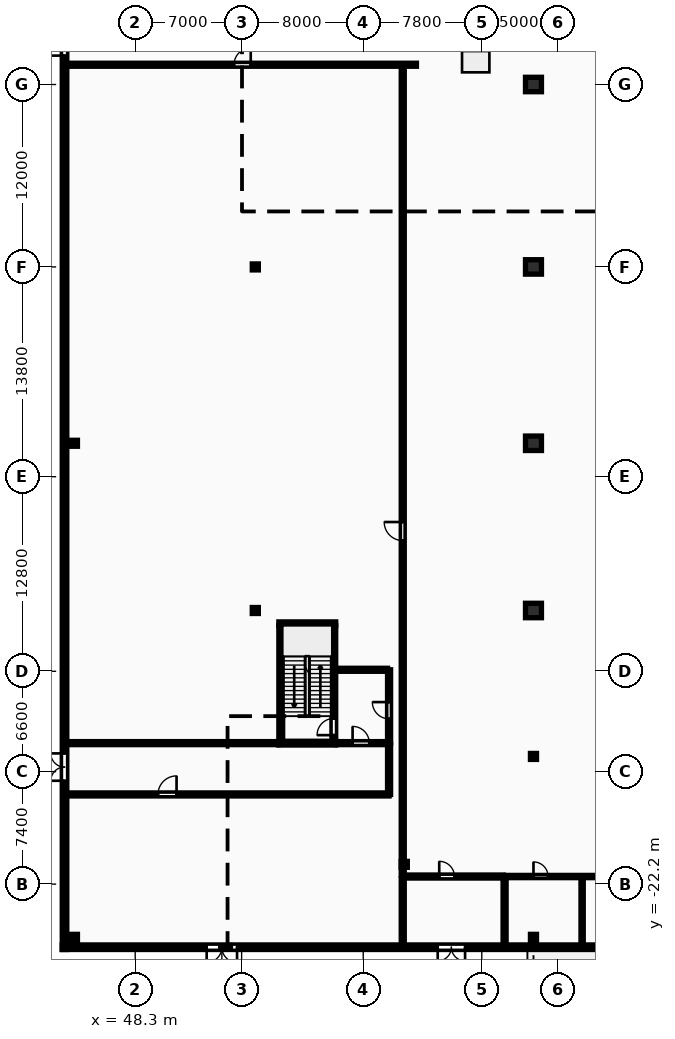
"""IFC4 building model, lengths in metres.
Left out: names, types, materials, properties, quantities, classifications, styles, units other than length and angle.
Written with IfcOpenShell. Run it as: python <this file> out.ifc"""

import sys

from ifc_helpers import new_model, si_unit, direction, frame, frame_2d, origin, origin_2d, place, context, subcontext, project, spatial, rectangle, i_section, extrude, element, fill, save


model = new_model("IFC4")
c1 = context("Model", 3, precision=1e-05, world=origin(), true_north=direction((0.0, 1.0)))
c2 = subcontext(c1, "Body", "Model", "MODEL_VIEW")
j1 = project(units=[si_unit("LENGTHUNIT", "METRE"), si_unit("PLANEANGLEUNIT", "RADIAN")], contexts=[c1])
p1 = place(None, origin())
s1 = spatial("IfcSite", under=j1, at=p1, CompositionType="ELEMENT")
p2 = place(p1, origin())
s2 = spatial("IfcBuilding", under=s1, at=p2, CompositionType="ELEMENT")
p3 = place(p2, origin())
s3 = spatial("IfcBuildingStorey", under=s2, at=p3, CompositionType="ELEMENT", Elevation=0.0)
for number, where, z_axis, x_axis in (
    (1, (74.5, -4.2, 0.0), (0.0, 0.0, 1.0), (1.0, 0.0, 0.0)),
    (2, (74.5, 6.8, 0.0), (0.0, 0.0, 1.0), (1.0, 0.0, 0.0)),
    (3, (74.5, 18.4, 0.0), (0.0, 0.0, 1.0), (1.0, 0.0, 0.0)),
    (4, (74.5, 30.4, 0.0), (0.0, 0.0, 1.0), (1.0, 0.0, 0.0)),
):
    element("IfcColumn", number, at=place(p3, frame(where, z_axis=z_axis, x_axis=x_axis)), inside=s3, PredefinedType="COLUMN", context=c2, shape_type="SweptSolid", body=[
        extrude(rectangle(XDim=1.05, YDim=0.95, at=origin_2d()), origin(), (0.0, 0.0, 1.0), 5.4),
    ])
for number, where, z_axis, x_axis in (
    (5, (56.2, -4.2, 0.0), (0.0, 0.0, 1.0), (1.0, 0.0, 0.0)),
    (6, (56.2, 18.4, 0.0), (0.0, 0.0, 1.0), (1.0, 0.0, 0.0)),
    (7, (74.5, -13.8, 0.0), (0.0, 0.0, 1.0), (1.0, 0.0, 0.0)),
    (8, (66.0, -20.9, 0.0), (0.0, 0.0, 1.0), (1.0, 0.0, 0.0)),
    (9, (44.3, -25.7, 0.0), (0.0, 0.0, 1.0), (1.0, 0.0, 0.0)),
    (10, (44.3, 6.8, 0.0), (0.0, 0.0, 1.0), (1.0, 0.0, 0.0)),
    (11, (74.5, -25.7, 0.0), (0.0, 0.0, 1.0), (1.0, 0.0, 0.0)),
):
    element("IfcColumn", number, at=place(p3, frame(where, z_axis=z_axis, x_axis=x_axis)), inside=s3, PredefinedType="COLUMN", context=c2, shape_type="SweptSolid", body=[
        extrude(i_section(OverallWidth=0.399, OverallDepth=0.394, WebThickness=0.023, FlangeThickness=0.037, FilletRadius=0.015, at=origin_2d()), origin(), (0.0, 0.0, 1.0), 5.4),
    ])
p4 = place(p3, frame((43.5, -26.35, 0.0), z_axis=(0.0, 0.0, 1.0), x_axis=(1.0, 0.0, 0.0)))
e12 = element("IfcWall", 12, at=p4, inside=s3, PredefinedType="STANDARD", context=c2, shape_type="SweptSolid", body=[
    extrude(rectangle(XDim=46.0, YDim=0.3, at=frame_2d((23.0, 0.0))), origin(), (0.0, 0.0, 1.0), 5.1),
])
p5 = place(p4, frame((9.5, 0.0, 0.0)))
e13 = element("IfcOpeningElement", 13, at=p5, cuts=e12, PredefinedType="OPENING", context=c2, shape_type="SweptSolid", body=[
    extrude(rectangle(XDim=2.0, YDim=2.6, at=frame_2d((1.0, 1.3))), frame((0.0, 0.16, 0.0), z_axis=(0.0, -1.0, 0.0), x_axis=(1.0, 0.0, 0.0)), (0.0, 0.0, 1.0), 0.32),
])
p6 = place(p4, frame((24.7, 0.0, 0.0)))
e14 = element("IfcOpeningElement", 14, at=p6, cuts=e12, PredefinedType="OPENING", context=c2, shape_type="SweptSolid", body=[
    extrude(rectangle(XDim=1.8, YDim=2.2, at=frame_2d((0.9, 1.1))), frame((0.0, 0.16, 0.0), z_axis=(0.0, -1.0, 0.0), x_axis=(1.0, 0.0, 0.0)), (0.0, 0.0, 1.0), 0.32),
])
p7 = place(p4, frame((43.4, 0.0, 0.0)))
e15 = element("IfcOpeningElement", 15, at=p7, cuts=e12, PredefinedType="OPENING", context=c2, shape_type="SweptSolid", body=[
    extrude(rectangle(XDim=1.8, YDim=2.2, at=frame_2d((0.9, 1.1))), frame((0.0, 0.16, 0.0), z_axis=(0.0, -1.0, 0.0), x_axis=(1.0, 0.0, 0.0)), (0.0, 0.0, 1.0), 0.32),
])
p8 = place(p3, frame((43.65, 109.2, 0.0), z_axis=(0.0, 0.0, 1.0), x_axis=(0.0, -1.0, 0.0)))
e16 = element("IfcWall", 16, at=p8, inside=s3, PredefinedType="STANDARD", context=c2, shape_type="SweptSolid", body=[
    extrude(rectangle(XDim=135.7, YDim=0.3, at=frame_2d((67.85, 0.0))), origin(), (0.0, 0.0, 1.0), 5.1),
])
p9 = place(p8, frame((75.1, 0.0, 0.0)))
e17 = element("IfcOpeningElement", 17, at=p9, cuts=e16, PredefinedType="OPENING", context=c2, shape_type="SweptSolid", body=[
    extrude(rectangle(XDim=1.8, YDim=2.2, at=frame_2d((0.9, 1.1))), frame((0.0, 0.16, 0.0), z_axis=(0.0, -1.0, 0.0), x_axis=(1.0, 0.0, 0.0)), (0.0, 0.0, 1.0), 0.32),
])
p10 = place(p8, frame((28.1, 0.0, 0.0)))
e18 = element("IfcOpeningElement", 18, at=p10, cuts=e16, PredefinedType="OPENING", context=c2, shape_type="SweptSolid", body=[
    extrude(rectangle(XDim=1.8, YDim=2.2, at=frame_2d((0.9, 1.1))), frame((0.0, 0.16, 0.0), z_axis=(0.0, -1.0, 0.0), x_axis=(1.0, 0.0, 0.0)), (0.0, 0.0, 1.0), 0.32),
])
p11 = place(p8, frame((36.0, 0.0, 0.0)))
e19 = element("IfcOpeningElement", 19, at=p11, cuts=e16, PredefinedType="OPENING", context=c2, shape_type="SweptSolid", body=[
    extrude(rectangle(XDim=2.0, YDim=2.6, at=frame_2d((1.0, 1.3))), frame((0.0, 0.16, 0.0), z_axis=(0.0, -1.0, 0.0), x_axis=(1.0, 0.0, 0.0)), (0.0, 0.0, 1.0), 0.32),
])
p12 = place(p8, frame((48.0, 0.0, 0.0)))
e20 = element("IfcOpeningElement", 20, at=p12, cuts=e16, PredefinedType="OPENING", context=c2, shape_type="SweptSolid", body=[
    extrude(rectangle(XDim=1.8, YDim=2.2, at=frame_2d((0.9, 1.1))), frame((0.0, 0.16, 0.0), z_axis=(0.0, -1.0, 0.0), x_axis=(1.0, 0.0, 0.0)), (0.0, 0.0, 1.0), 0.32),
])
p13 = place(p8, frame((122.8, 0.0, 0.0)))
e21 = element("IfcOpeningElement", 21, at=p13, cuts=e16, PredefinedType="OPENING", context=c2, shape_type="SweptSolid", body=[
    extrude(rectangle(XDim=1.8, YDim=2.2, at=frame_2d((0.9, 1.1))), frame((0.0, 0.16, 0.0), z_axis=(0.0, -1.0, 0.0), x_axis=(1.0, 0.0, 0.0)), (0.0, 0.0, 1.0), 0.32),
])
p14 = place(p3, frame((57.875, -12.8, 0.0), z_axis=(0.0, 0.0, 1.0), x_axis=(0.0, 1.0, 0.0)))
e22 = element("IfcWall", 22, at=p14, inside=s3, PredefinedType="SHEAR", context=c2, shape_type="SweptSolid", body=[
    extrude(rectangle(XDim=7.6, YDim=0.25, at=frame_2d((3.8, 0.0))), origin(), (0.0, 0.0, 1.0), 5.4),
])
for number, where, z_axis, x_axis in (
    (23, (57.75, -12.925, 0.0), (0.0, 0.0, 1.0), (1.0, 0.0, 0.0)),
    (24, (57.75, -5.075, 0.0), (0.0, 0.0, 1.0), (1.0, 0.0, 0.0)),
):
    element("IfcWall", number, at=place(p3, frame(where, z_axis=z_axis, x_axis=x_axis)), inside=s3, PredefinedType="SHEAR", context=c2, shape_type="SweptSolid", body=[
        extrude(rectangle(XDim=3.74, YDim=0.25, at=frame_2d((1.87, 0.0))), origin(), (0.0, 0.0, 1.0), 5.4),
    ])
p15 = place(p3, frame((61.365, -12.8, 0.0), z_axis=(0.0, 0.0, 1.0), x_axis=(0.0, 1.0, 0.0)))
e25 = element("IfcWall", 25, at=p15, inside=s3, PredefinedType="SHEAR", context=c2, shape_type="SweptSolid", body=[
    extrude(rectangle(XDim=7.6, YDim=0.25, at=frame_2d((3.8, 0.0))), origin(), (0.0, 0.0, 1.0), 5.4),
])
p16 = place(p15, frame((0.4, 0.0, 0.0)))
e26 = element("IfcOpeningElement", 26, at=p16, cuts=e25, PredefinedType="OPENING", context=c2, shape_type="SweptSolid", body=[
    extrude(rectangle(XDim=1.1, YDim=2.1, at=frame_2d((0.55, 1.05))), frame((0.0, 0.135, 0.0), z_axis=(0.0, -1.0, 0.0), x_axis=(1.0, 0.0, 0.0)), (0.0, 0.0, 1.0), 0.27),
])
p17 = place(p3, frame((65.0, -12.925, 0.0), z_axis=(0.0, 0.0, 1.0), x_axis=(0.0, 1.0, 0.0)))
e27 = element("IfcWall", 27, at=p17, inside=s3, PredefinedType="PARTITIONING", context=c2, shape_type="SweptSolid", body=[
    extrude(rectangle(XDim=4.825, YDim=0.2, at=frame_2d((2.413, 0.0))), origin(), (0.0, 0.0, 1.0), 5.1),
])
p18 = place(p17, frame((1.6, 0.0, 0.0)))
e28 = element("IfcOpeningElement", 28, at=p18, cuts=e27, PredefinedType="OPENING", context=c2, shape_type="SweptSolid", body=[
    extrude(rectangle(XDim=1.1, YDim=2.15, at=frame_2d((0.55, 1.075))), frame((0.0, 0.11, 0.0), z_axis=(0.0, -1.0, 0.0), x_axis=(1.0, 0.0, 0.0)), (0.0, 0.0, 1.0), 0.22),
])
p19 = place(p3, frame((61.5, -12.925, 0.0), z_axis=(0.0, 0.0, 1.0), x_axis=(1.0, 0.0, 0.0)))
e29 = element("IfcWall", 29, at=p19, inside=s3, PredefinedType="PARTITIONING", context=c2, shape_type="SweptSolid", body=[
    extrude(rectangle(XDim=3.4, YDim=0.2, at=frame_2d((1.7, 0.0))), origin(), (0.0, 0.0, 1.0), 5.1),
])
p20 = place(p19, frame((1.1, 0.0, 0.0)))
e30 = element("IfcOpeningElement", 30, at=p20, cuts=e29, PredefinedType="OPENING", context=c2, shape_type="SweptSolid", body=[
    extrude(rectangle(XDim=1.1, YDim=2.1, at=frame_2d((0.55, 1.05))), frame((0.0, 0.11, 0.0), z_axis=(0.0, -1.0, 0.0), x_axis=(1.0, 0.0, 0.0)), (0.0, 0.0, 1.0), 0.22),
])
p21 = place(p3, frame((61.5, -8.1, 0.0), z_axis=(0.0, 0.0, 1.0), x_axis=(1.0, 0.0, 0.0)))
e31 = element("IfcWall", 31, at=p21, inside=s3, PredefinedType="PARTITIONING", context=c2, shape_type="SweptSolid", body=[
    extrude(rectangle(XDim=3.4, YDim=0.2, at=frame_2d((1.7, 0.0))), origin(), (0.0, 0.0, 1.0), 5.1),
])
p22 = place(p3, frame((65.9, -21.7, 0.0), z_axis=(0.0, 0.0, 1.0), x_axis=(1.0, 0.0, 0.0)))
e32 = element("IfcWall", 32, at=p22, inside=s3, PredefinedType="PARTITIONING", context=c2, shape_type="SweptSolid", body=[
    extrude(rectangle(XDim=6.6, YDim=0.2, at=frame_2d((3.3, 0.0))), origin(), (0.0, 0.0, 1.0), 5.1),
])
p23 = place(p22, frame((2.4, 0.0, 0.0)))
e33 = element("IfcOpeningElement", 33, at=p23, cuts=e32, PredefinedType="OPENING", context=c2, shape_type="SweptSolid", body=[
    extrude(rectangle(XDim=1.0, YDim=2.1, at=frame_2d((0.5, 1.05))), frame((0.0, 0.11, 0.0), z_axis=(0.0, -1.0, 0.0), x_axis=(1.0, 0.0, 0.0)), (0.0, 0.0, 1.0), 0.22),
])
for number, where, z_axis, x_axis in (
    (34, (65.9, -26.2, 0.0), (0.0, 0.0, 1.0), (0.0, 1.0, 0.0)),
    (35, (72.6, -26.2, 0.0), (0.0, 0.0, 1.0), (0.0, 1.0, 0.0)),
):
    element("IfcWall", number, at=place(p3, frame(where, z_axis=z_axis, x_axis=x_axis)), inside=s3, PredefinedType="PARTITIONING", context=c2, shape_type="SweptSolid", body=[
        extrude(rectangle(XDim=4.35, YDim=0.2, at=frame_2d((2.175, 0.0))), origin(), (0.0, 0.0, 1.0), 5.1),
    ])
p24 = place(p3, frame((43.8, 31.7, 0.0), z_axis=(0.0, 0.0, 1.0), x_axis=(1.0, 0.0, 0.0)))
e36 = element("IfcWall", 36, at=p24, inside=s3, PredefinedType="PARTITIONING", context=c2, shape_type="SweptSolid", body=[
    extrude(rectangle(XDim=23.0, YDim=0.2, at=frame_2d((11.5, 0.0))), origin(), (0.0, 0.0, 1.0), 5.1),
])
p25 = place(p24, frame((11.0, 0.0, 0.0)))
e37 = element("IfcOpeningElement", 37, at=p25, cuts=e36, PredefinedType="OPENING", context=c2, shape_type="SweptSolid", body=[
    extrude(rectangle(XDim=1.1, YDim=2.1, at=frame_2d((0.55, 1.05))), frame((0.0, 0.11, 0.0), z_axis=(0.0, -1.0, 0.0), x_axis=(1.0, 0.0, 0.0)), (0.0, 0.0, 1.0), 0.22),
])
p26 = place(p3, frame((43.8, -16.3, 0.0), z_axis=(0.0, 0.0, 1.0), x_axis=(1.0, 0.0, 0.0)))
e38 = element("IfcWall", 38, at=p26, inside=s3, PredefinedType="PARTITIONING", context=c2, shape_type="SweptSolid", body=[
    extrude(rectangle(XDim=21.2, YDim=0.2, at=frame_2d((10.6, 0.0))), origin(), (0.0, 0.0, 1.0), 5.1),
])
p27 = place(p26, frame((6.0, 0.0, 0.0)))
e39 = element("IfcOpeningElement", 39, at=p27, cuts=e38, PredefinedType="OPENING", context=c2, shape_type="SweptSolid", body=[
    extrude(rectangle(XDim=1.22, YDim=2.18, at=frame_2d((0.61, 1.09))), frame((0.0, 0.11, 0.0), z_axis=(0.0, -1.0, 0.0), x_axis=(1.0, 0.0, 0.0)), (0.0, 0.0, 1.0), 0.22),
])
p28 = place(p3, frame((43.8, -12.925, 0.0), z_axis=(0.0, 0.0, 1.0), x_axis=(1.0, 0.0, 0.0)))
e40 = element("IfcWall", 40, at=p28, inside=s3, PredefinedType="PARTITIONING", context=c2, shape_type="SweptSolid", body=[
    extrude(rectangle(XDim=13.9, YDim=0.2, at=frame_2d((6.95, 0.0))), origin(), (0.0, 0.0, 1.0), 5.1),
])
p29 = place(p3, frame((65.0, -16.3, 0.0), z_axis=(0.0, 0.0, 1.0), x_axis=(0.0, 1.0, 0.0)))
e41 = element("IfcWall", 41, at=p29, inside=s3, PredefinedType="PARTITIONING", context=c2, shape_type="SweptSolid", body=[
    extrude(rectangle(XDim=3.3, YDim=0.2, at=frame_2d((1.65, 0.0))), origin(), (0.0, 0.0, 1.0), 5.1),
])
p30 = place(p3, frame((72.7, -21.7, 0.0), z_axis=(0.0, 0.0, 1.0), x_axis=(1.0, 0.0, 0.0)))
e42 = element("IfcWall", 42, at=p30, inside=s3, PredefinedType="PARTITIONING", context=c2, shape_type="SweptSolid", body=[
    extrude(rectangle(XDim=13.5, YDim=0.15, at=frame_2d((6.75, 0.0))), origin(), (0.0, 0.0, 1.0), 5.1),
])
p31 = place(p30, frame((1.8, 0.0, 0.0)))
e43 = element("IfcOpeningElement", 43, at=p31, cuts=e42, PredefinedType="OPENING", context=c2, shape_type="SweptSolid", body=[
    extrude(rectangle(XDim=0.96, YDim=2.1, at=frame_2d((0.48, 1.05))), frame((0.0, 0.085, 0.0), z_axis=(0.0, -1.0, 0.0), x_axis=(1.0, 0.0, 0.0)), (0.0, 0.0, 1.0), 0.17),
])
p32 = place(p30, frame((6.4, 0.0, 0.0)))
e44 = element("IfcOpeningElement", 44, at=p32, cuts=e42, PredefinedType="OPENING", context=c2, shape_type="SweptSolid", body=[
    extrude(rectangle(XDim=0.92, YDim=2.08, at=frame_2d((0.46, 1.04))), frame((0.0, 0.085, 0.0), z_axis=(0.0, -1.0, 0.0), x_axis=(1.0, 0.0, 0.0)), (0.0, 0.0, 1.0), 0.17),
])
p33 = place(p30, frame((10.6, 0.0, 0.0)))
e45 = element("IfcOpeningElement", 45, at=p33, cuts=e42, PredefinedType="OPENING", context=c2, shape_type="SweptSolid", body=[
    extrude(rectangle(XDim=0.92, YDim=2.08, at=frame_2d((0.46, 1.04))), frame((0.0, 0.085, 0.0), z_axis=(0.0, -1.0, 0.0), x_axis=(1.0, 0.0, 0.0)), (0.0, 0.0, 1.0), 0.17),
])
p34 = place(p3, frame((77.7, -26.2, 0.0), z_axis=(0.0, 0.0, 1.0), x_axis=(0.0, 1.0, 0.0)))
e46 = element("IfcWall", 46, at=p34, inside=s3, PredefinedType="PARTITIONING", context=c2, shape_type="SweptSolid", body=[
    extrude(rectangle(XDim=4.4, YDim=0.15, at=frame_2d((2.2, 0.0))), origin(), (0.0, 0.0, 1.0), 5.1),
])
p35 = place(p3, frame((65.9, -21.6, 0.0), z_axis=(0.0, 0.0, 1.0), x_axis=(0.0, 1.0, 0.0)))
e47 = element("IfcWall", 47, at=p35, inside=s3, PredefinedType="PARTITIONING", context=c2, shape_type="SweptSolid", body=[
    extrude(rectangle(XDim=53.15, YDim=0.2, at=frame_2d((26.575, 0.0))), origin(), (0.0, 0.0, 1.0), 5.1),
])
p36 = place(p35, frame((22.0, 0.0, 0.0)))
e48 = element("IfcOpeningElement", 48, at=p36, cuts=e47, PredefinedType="OPENING", context=c2, shape_type="SweptSolid", body=[
    extrude(rectangle(XDim=1.22, YDim=2.18, at=frame_2d((0.61, 1.09))), frame((0.0, 0.11, 0.0), z_axis=(0.0, -1.0, 0.0), x_axis=(1.0, 0.0, 0.0)), (0.0, 0.0, 1.0), 0.22),
])
p37 = place(p5, frame((2.0, 0.0, 0.0), z_axis=(0.0, 0.0, 1.0), x_axis=(-1.0, 0.0, 0.0)))
e49 = element("IfcDoor", 49, at=p37, inside=s3, OperationType="DOUBLE_DOOR_SINGLE_SWING", PredefinedType="DOOR", context=c2, shape_type="SweptSolid", body=[
    extrude(rectangle(XDim=2.0, YDim=2.6, at=frame_2d((1.0, 1.3))), frame((0.0, 0.025, 0.0), z_axis=(0.0, -1.0, 0.0), x_axis=(1.0, 0.0, 0.0)), (0.0, 0.0, 1.0), 0.05),
])
fill(e13, e49)
p38 = place(p6, frame((1.8, 0.0, 0.0), z_axis=(0.0, 0.0, 1.0), x_axis=(-1.0, 0.0, 0.0)))
e50 = element("IfcDoor", 50, at=p38, inside=s3, OperationType="DOUBLE_DOOR_SINGLE_SWING", PredefinedType="DOOR", context=c2, shape_type="SweptSolid", body=[
    extrude(rectangle(XDim=1.8, YDim=2.2, at=frame_2d((0.9, 1.1))), frame((0.0, 0.025, 0.0), z_axis=(0.0, -1.0, 0.0), x_axis=(1.0, 0.0, 0.0)), (0.0, 0.0, 1.0), 0.05),
])
fill(e14, e50)
p39 = place(p9, frame((1.8, 0.0, 0.0), z_axis=(0.0, 0.0, 1.0), x_axis=(-1.0, 0.0, 0.0)))
e51 = element("IfcDoor", 51, at=p39, inside=s3, OperationType="DOUBLE_DOOR_SINGLE_SWING", PredefinedType="DOOR", context=c2, shape_type="SweptSolid", body=[
    extrude(rectangle(XDim=1.8, YDim=2.2, at=frame_2d((0.9, 1.1))), frame((0.0, 0.025, 0.0), z_axis=(0.0, -1.0, 0.0), x_axis=(1.0, 0.0, 0.0)), (0.0, 0.0, 1.0), 0.05),
])
fill(e17, e51)
p40 = place(p13, frame((1.8, 0.0, 0.0), z_axis=(0.0, 0.0, 1.0), x_axis=(-1.0, 0.0, 0.0)))
e52 = element("IfcDoor", 52, at=p40, inside=s3, OperationType="DOUBLE_DOOR_SINGLE_SWING", PredefinedType="DOOR", context=c2, shape_type="SweptSolid", body=[
    extrude(rectangle(XDim=1.8, YDim=2.2, at=frame_2d((0.9, 1.1))), frame((0.0, 0.025, 0.0), z_axis=(0.0, -1.0, 0.0), x_axis=(1.0, 0.0, 0.0)), (0.0, 0.0, 1.0), 0.05),
])
fill(e21, e52)
p41 = place(p16, origin())
e53 = element("IfcDoor", 53, at=p41, inside=s3, OperationType="SINGLE_SWING_LEFT", PredefinedType="DOOR", context=c2, shape_type="SweptSolid", body=[
    extrude(rectangle(XDim=1.1, YDim=2.1, at=frame_2d((0.55, 1.05))), frame((0.0, 0.025, 0.0), z_axis=(0.0, -1.0, 0.0), x_axis=(1.0, 0.0, 0.0)), (0.0, 0.0, 1.0), 0.05),
])
fill(e26, e53)
p42 = place(p18, origin())
e54 = element("IfcDoor", 54, at=p42, inside=s3, OperationType="SINGLE_SWING_RIGHT", PredefinedType="DOOR", context=c2, shape_type="SweptSolid", body=[
    extrude(rectangle(XDim=1.1, YDim=2.15, at=frame_2d((0.55, 1.075))), frame((0.0, 0.025, 0.0), z_axis=(0.0, -1.0, 0.0), x_axis=(1.0, 0.0, 0.0)), (0.0, 0.0, 1.0), 0.05),
])
fill(e28, e54)
p43 = place(p20, origin())
e55 = element("IfcDoor", 55, at=p43, inside=s3, OperationType="SINGLE_SWING_LEFT", PredefinedType="DOOR", context=c2, shape_type="SweptSolid", body=[
    extrude(rectangle(XDim=1.1, YDim=2.1, at=frame_2d((0.55, 1.05))), frame((0.0, 0.025, 0.0), z_axis=(0.0, -1.0, 0.0), x_axis=(1.0, 0.0, 0.0)), (0.0, 0.0, 1.0), 0.05),
])
fill(e30, e55)
p44 = place(p23, origin())
e56 = element("IfcDoor", 56, at=p44, inside=s3, OperationType="SINGLE_SWING_LEFT", PredefinedType="DOOR", context=c2, shape_type="SweptSolid", body=[
    extrude(rectangle(XDim=1.0, YDim=2.1, at=frame_2d((0.5, 1.05))), frame((0.0, 0.025, 0.0), z_axis=(0.0, -1.0, 0.0), x_axis=(1.0, 0.0, 0.0)), (0.0, 0.0, 1.0), 0.05),
])
fill(e33, e56)
p45 = place(p25, origin())
e57 = element("IfcDoor", 57, at=p45, inside=s3, OperationType="SINGLE_SWING_RIGHT", PredefinedType="DOOR", context=c2, shape_type="SweptSolid", body=[
    extrude(rectangle(XDim=1.1, YDim=2.1, at=frame_2d((0.55, 1.05))), frame((0.0, 0.025, 0.0), z_axis=(0.0, -1.0, 0.0), x_axis=(1.0, 0.0, 0.0)), (0.0, 0.0, 1.0), 0.05),
])
fill(e37, e57)
p46 = place(p27, origin())
e58 = element("IfcDoor", 58, at=p46, inside=s3, OperationType="SINGLE_SWING_RIGHT", PredefinedType="DOOR", context=c2, shape_type="SweptSolid", body=[
    extrude(rectangle(XDim=1.22, YDim=2.18, at=frame_2d((0.61, 1.09))), frame((0.0, 0.025, 0.0), z_axis=(0.0, -1.0, 0.0), x_axis=(1.0, 0.0, 0.0)), (0.0, 0.0, 1.0), 0.05),
])
fill(e39, e58)
p47 = place(p31, origin())
e59 = element("IfcDoor", 59, at=p47, inside=s3, OperationType="SINGLE_SWING_LEFT", PredefinedType="DOOR", context=c2, shape_type="SweptSolid", body=[
    extrude(rectangle(XDim=0.96, YDim=2.1, at=frame_2d((0.48, 1.05))), frame((0.0, 0.025, 0.0), z_axis=(0.0, -1.0, 0.0), x_axis=(1.0, 0.0, 0.0)), (0.0, 0.0, 1.0), 0.05),
])
fill(e43, e59)
p48 = place(p36, origin())
e60 = element("IfcDoor", 60, at=p48, inside=s3, OperationType="SINGLE_SWING_RIGHT", PredefinedType="DOOR", context=c2, shape_type="SweptSolid", body=[
    extrude(rectangle(XDim=1.22, YDim=2.18, at=frame_2d((0.61, 1.09))), frame((0.0, 0.025, 0.0), z_axis=(0.0, -1.0, 0.0), x_axis=(1.0, 0.0, 0.0)), (0.0, 0.0, 1.0), 0.05),
])
fill(e48, e60)
save(model, sys.argv[1])
